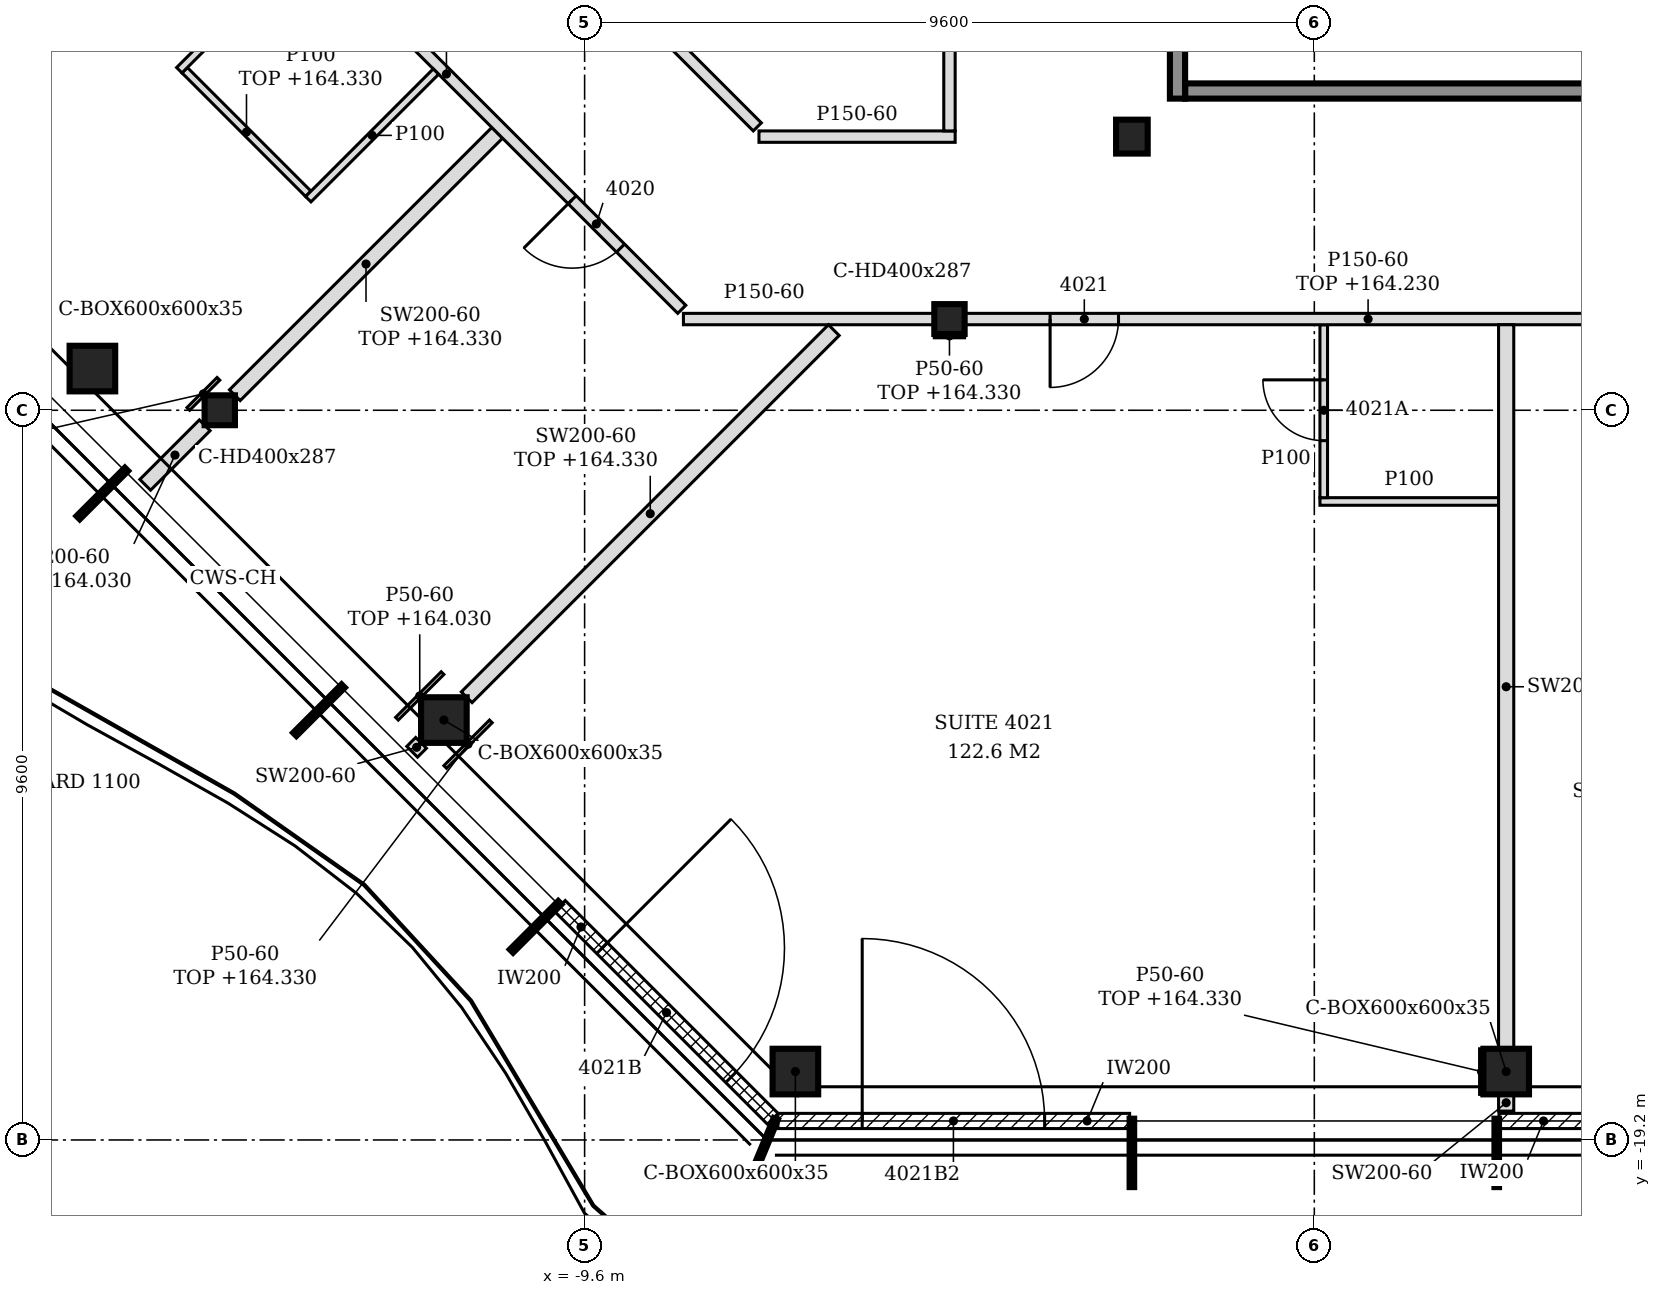
"""IFC4 building model, lengths in metres.
Left out: names, types, materials, properties, quantities, classifications, styles, units other than length and angle.
Written with IfcOpenShell. Run it as: python <this file> out.ifc"""

import sys

from ifc_helpers import new_model, si_unit, direction, frame, frame_2d, origin, origin_2d, place, context, subcontext, project, spatial, polyline, rectangle, hollow_rectangle, i_section, outline, extrude, element, fill, save


model = new_model("IFC4")
c1 = context("Model", 3, precision=1e-05, world=origin(), true_north=direction((0.0, 1.0)))
c2 = subcontext(c1, "Body", "Model", "MODEL_VIEW")
j1 = project(units=[si_unit("LENGTHUNIT", "METRE"), si_unit("PLANEANGLEUNIT", "RADIAN")], contexts=[c1])
p1 = place(None, origin())
s1 = spatial("IfcSite", under=j1, at=p1, CompositionType="ELEMENT")
p2 = place(p1, origin())
s2 = spatial("IfcBuilding", under=s1, at=p2, CompositionType="ELEMENT")
p3 = place(p2, frame((0.0, 0.0, 161.4)))
s3 = spatial("IfcBuildingStorey", under=s2, at=p3, CompositionType="ELEMENT", Elevation=161.4)
for number, where, z_axis, x_axis in (
    (1, (-6.827, -18.3, -0.15), (0.0, 0.0, 1.0), (1.0, 0.0, 0.0)),
    (2, (2.524, -18.3, -0.15), (0.0, 0.0, 1.0), (1.0, 0.0, 0.0)),
    (3, (-16.076, -9.052, -0.15), (0.0, 0.0, 1.0), (1.0, 0.0, 0.0)),
    (4, (-11.451, -13.676, -0.15), (0.0, 0.0, 1.0), (1.0, 0.0, 0.0)),
):
    element("IfcColumn", number, at=place(p3, frame(where, z_axis=z_axis, x_axis=x_axis)), inside=s3, PredefinedType="COLUMN", context=c2, shape_type="SweptSolid", body=[
        extrude(hollow_rectangle(XDim=0.6, YDim=0.6, WallThickness=0.035, at=origin_2d()), origin(), (0.0, 0.0, 1.0), 3.6),
    ])
p4 = place(p3, frame((-4.8, -8.4, -0.15), z_axis=(0.0, 0.0, 1.0), x_axis=(1.0, 0.0, 0.0)))
e5 = element("IfcColumn", 5, at=p4, inside=s3, PredefinedType="COLUMN", context=c2, shape_type="SweptSolid", body=[
    extrude(i_section(OverallWidth=0.399, OverallDepth=0.393, WebThickness=0.023, FlangeThickness=0.037, FilletRadius=0.015, at=origin_2d()), origin(), (0.0, 0.0, 1.0), 3.6),
])
p5 = place(p3, frame((-2.4, -6.0, -0.15), z_axis=(0.0, 0.0, 1.0), x_axis=(1.0, 0.0, 0.0)))
e6 = element("IfcColumn", 6, at=p5, inside=s3, PredefinedType="COLUMN", context=c2, shape_type="SweptSolid", body=[
    extrude(i_section(OverallWidth=0.416, OverallDepth=0.446, WebThickness=0.039, FlangeThickness=0.063, FilletRadius=0.015, at=origin_2d()), origin(), (0.0, 0.0, 1.0), 3.6),
])
p6 = place(p3, frame((-14.4, -9.6, -0.15), z_axis=(0.0, 0.0, 1.0), x_axis=(1.0, 0.0, 0.0)))
e7 = element("IfcColumn", 7, at=p6, inside=s3, PredefinedType="COLUMN", context=c2, shape_type="SweptSolid", body=[
    extrude(i_section(OverallWidth=0.399, OverallDepth=0.393, WebThickness=0.023, FlangeThickness=0.037, FilletRadius=0.015, at=origin_2d()), origin(), (0.0, 0.0, 1.0), 3.6),
])
p7 = place(p3, frame((-7.056, -18.95, 0.0), z_axis=(0.0, 0.0, 1.0), x_axis=(1.0, 0.0, 0.0)))
e8 = element("IfcWall", 8, at=p7, inside=s3, PredefinedType="NOTDEFINED", context=c2, shape_type="SweptSolid", body=[
    extrude(rectangle(XDim=4.626, YDim=0.2, at=frame_2d((2.313, 0.0))), origin(), (0.0, 0.0, 1.0), 3.45),
])
p8 = place(p7, frame((1.108, 0.0, 0.0)))
e9 = element("IfcOpeningElement", 9, at=p8, cuts=e8, PredefinedType="OPENING", context=c2, shape_type="SweptSolid", body=[
    extrude(rectangle(XDim=2.4, YDim=2.4, at=frame_2d((1.2, 1.2))), frame((0.0, 0.11, 0.0), z_axis=(0.0, -1.0, 0.0), x_axis=(1.0, 0.0, 0.0)), (0.0, 0.0, 1.0), 0.22),
])
p9 = place(p3, frame((2.43, -18.95, 0.0), z_axis=(0.0, 0.0, 1.0), x_axis=(1.0, 0.0, 0.0)))
e10 = element("IfcWall", 10, at=p9, inside=s3, PredefinedType="NOTDEFINED", context=c2, shape_type="SweptSolid", body=[
    extrude(rectangle(XDim=4.74, YDim=0.2, at=frame_2d((2.37, 0.0))), origin(), (0.0, 0.0, 1.0), 3.45),
])
p10 = place(p9, frame((1.17, 0.0, 0.0)))
e11 = element("IfcOpeningElement", 11, at=p10, cuts=e10, PredefinedType="OPENING", context=c2, shape_type="SweptSolid", body=[
    extrude(rectangle(XDim=2.4, YDim=2.4, at=frame_2d((1.2, 1.2))), frame((0.0, 0.11, 0.0), z_axis=(0.0, -1.0, 0.0), x_axis=(1.0, 0.0, 0.0)), (0.0, 0.0, 1.0), 0.22),
])
p11 = place(p3, frame((-9.926, -16.121, 0.0), z_axis=(0.0, 0.0, 1.0), x_axis=(0.707137595296, -0.707075965734, 0.0)))
e12 = element("IfcWall", 12, at=p11, inside=s3, PredefinedType="NOTDEFINED", context=c2, shape_type="SweptSolid", body=[
    extrude(rectangle(XDim=3.961, YDim=0.2, at=frame_2d((1.981, 0.0))), origin(), (0.0, 0.0, 1.0), 3.45),
])
p12 = place(p11, frame((0.786, 0.0, 0.0)))
e13 = element("IfcOpeningElement", 13, at=p12, cuts=e12, PredefinedType="OPENING", context=c2, shape_type="SweptSolid", body=[
    extrude(rectangle(XDim=2.4, YDim=2.4, at=frame_2d((1.2, 1.2))), frame((0.0, 0.11, 0.0), z_axis=(0.0, -1.0, 0.0), x_axis=(1.0, 0.0, 0.0)), (0.0, 0.0, 1.0), 0.22),
])
p13 = place(p3, frame((-1.7, -5.4, 0.0), z_axis=(0.0, 0.0, 1.0), x_axis=(1.0, 0.0, 0.0)))
e14 = element("IfcWall", 14, at=p13, inside=s3, PredefinedType="SOLIDWALL", context=c2, shape_type="SweptSolid", body=[
    extrude(rectangle(XDim=7.9, YDim=0.2, at=frame_2d((3.95, 0.0))), origin(), (0.0, 0.0, 1.0), 3.45),
])
p14 = place(p3, frame((-1.8, -5.5, 0.0), z_axis=(0.0, 0.0, 1.0), x_axis=(0.0, 1.0, 0.0)))
e15 = element("IfcWall", 15, at=p14, inside=s3, PredefinedType="SOLIDWALL", context=c2, shape_type="SweptSolid", body=[
    extrude(rectangle(XDim=15.8, YDim=0.2, at=frame_2d((7.9, 0.0))), origin(), (0.0, 0.0, 1.0), 3.45),
])
p15 = place(p14, frame((3.05, 0.0, 0.0)))
e16 = element("IfcOpeningElement", 16, at=p15, cuts=e15, PredefinedType="OPENING", context=c2, shape_type="SweptSolid", body=[
    extrude(rectangle(XDim=1.3, YDim=2.1, at=frame_2d((0.65, 1.05))), frame((0.0, 0.11, 0.0), z_axis=(0.0, -1.0, 0.0), x_axis=(1.0, 0.0, 0.0)), (0.0, 0.0, 1.0), 0.22),
])
p16 = place(p14, frame((11.45, 0.0, 0.0)))
e17 = element("IfcOpeningElement", 17, at=p16, cuts=e15, PredefinedType="OPENING", context=c2, shape_type="SweptSolid", body=[
    extrude(rectangle(XDim=1.3, YDim=2.1, at=frame_2d((0.65, 1.05))), frame((0.0, 0.11, 0.0), z_axis=(0.0, -1.0, 0.0), x_axis=(1.0, 0.0, 0.0)), (0.0, 0.0, 1.0), 0.22),
])
p17 = place(p3, frame((2.524, -18.82, 0.0), z_axis=(0.0, 0.0, 1.0), x_axis=(0.0, 1.0, 0.0)))
e18 = element("IfcWall", 18, at=p17, inside=s3, PredefinedType="PARTITIONING", context=c2, shape_type="SweptSolid", body=[
    extrude(rectangle(XDim=0.22, YDim=0.2, at=frame_2d((0.11, 0.0))), origin(), (0.0, 0.0, 1.0), 3.45),
])
p18 = place(p3, frame((2.524, -18.0, 0.0), z_axis=(0.0, 0.0, 1.0), x_axis=(0.0, 1.0, 0.0)))
e19 = element("IfcWall", 19, at=p18, inside=s3, PredefinedType="PARTITIONING", context=c2, shape_type="SweptSolid", body=[
    extrude(outline(polyline([(0.0, 0.0), (9.525, 0.0), (9.525, 2.83), (9.45, 2.83), (9.448, 3.45), (3.705, 3.45), (3.703, 2.88), (3.495, 2.88), (3.493, 3.45), (0.0, 3.45), (0.0, 0.0)])), frame((0.0, 0.1, 0.0), z_axis=(0.0, -1.0, 0.0), x_axis=(1.0, 0.0, 0.0)), (0.0, 0.0, 1.0), 0.2),
])
p19 = place(p3, frame((-11.869, -14.093, 0.0), z_axis=(0.0, 0.0, 1.0), x_axis=(0.707106781187, 0.707106781187, 0.0)))
e20 = element("IfcWall", 20, at=p19, inside=s3, PredefinedType="PARTITIONING", context=c2, shape_type="SweptSolid", body=[
    extrude(rectangle(XDim=0.166, YDim=0.2, at=frame_2d((0.083, 0.0))), origin(), (0.0, 0.0, 1.0), 3.45),
])
p20 = place(p3, frame((-11.152, -13.375, 0.0), z_axis=(0.0, 0.0, 1.0), x_axis=(0.707106781187, 0.707106781187, 0.0)))
e21 = element("IfcWall", 21, at=p20, inside=s3, PredefinedType="PARTITIONING", context=c2, shape_type="SweptSolid", body=[
    extrude(rectangle(XDim=6.83, YDim=0.2, at=frame_2d((3.415, 0.0))), origin(), (0.0, 0.0, 1.0), 2.93),
])
p21 = place(p3, frame((0.074, -10.8, 0.0), z_axis=(0.0, 0.0, 1.0), x_axis=(1.0, 0.0, 0.0)))
e22 = element("IfcWall", 22, at=p21, inside=s3, PredefinedType="PARTITIONING", context=c2, shape_type="SweptSolid", body=[
    extrude(rectangle(XDim=2.35, YDim=0.1, at=frame_2d((1.175, 0.0))), origin(), (0.0, 0.0, 1.0), 3.45),
])
p22 = place(p3, frame((0.124, -10.75, 0.0), z_axis=(0.0, 0.0, 1.0), x_axis=(0.0, 1.0, 0.0)))
e23 = element("IfcWall", 23, at=p22, inside=s3, PredefinedType="PARTITIONING", context=c2, shape_type="SweptSolid", body=[
    extrude(outline(polyline([(0.0, 0.0), (2.275, 0.0), (2.275, 2.83), (2.2, 2.83), (2.198, 3.45), (0.0, 3.45), (0.0, 0.0)])), frame((0.0, 0.05, 0.0), z_axis=(0.0, -1.0, 0.0), x_axis=(1.0, 0.0, 0.0)), (0.0, 0.0, 1.0), 0.1),
])
p23 = place(p22, frame((0.75, 0.0, 0.0)))
e24 = element("IfcOpeningElement", 24, at=p23, cuts=e23, PredefinedType="OPENING", context=c2, shape_type="SweptSolid", body=[
    extrude(rectangle(XDim=0.8, YDim=2.1, at=frame_2d((0.4, 1.05))), frame((0.0, 0.06, 0.0), z_axis=(0.0, -1.0, 0.0), x_axis=(1.0, 0.0, 0.0)), (0.0, 0.0, 1.0), 0.12),
])
p24 = place(p3, frame((-15.381, -10.581, 0.0), z_axis=(0.0, 0.0, 1.0), x_axis=(0.707217034054, 0.706996511125, 0.0)))
e25 = element("IfcWall", 25, at=p24, inside=s3, PredefinedType="PARTITIONING", context=c2, shape_type="SweptSolid", body=[
    extrude(rectangle(XDim=1.107, YDim=0.2, at=frame_2d((0.554, 0.0))), origin(), (0.0, 0.0, 1.0), 2.63),
])
p25 = place(p3, frame((-14.202, -9.402, 0.0), z_axis=(0.0, 0.0, 1.0), x_axis=(0.707081776084, 0.707131785404, 0.0)))
e26 = element("IfcWall", 26, at=p25, inside=s3, PredefinedType="PARTITIONING", context=c2, shape_type="SweptSolid", body=[
    extrude(rectangle(XDim=4.882, YDim=0.2, at=frame_2d((2.441, 0.0))), origin(), (0.0, 0.0, 1.0), 2.93),
])
p26 = place(p3, frame((-8.3, -8.4, 0.0), z_axis=(0.0, 0.0, 1.0), x_axis=(1.0, 0.0, 0.0)))
e27 = element("IfcWall", 27, at=p26, inside=s3, PredefinedType="PARTITIONING", context=c2, shape_type="SweptSolid", body=[
    extrude(rectangle(XDim=3.301, YDim=0.15, at=frame_2d((1.65, 0.0))), origin(), (0.0, 0.0, 1.0), 3.45),
])
p27 = place(p3, frame((-4.601, -8.4, 0.0), z_axis=(0.0, 0.0, 1.0), x_axis=(1.0, 0.0, 0.0)))
e28 = element("IfcWall", 28, at=p27, inside=s3, PredefinedType="PARTITIONING", context=c2, shape_type="SweptSolid", body=[
    extrude(rectangle(XDim=11.601, YDim=0.15, at=frame_2d((5.801, 0.0))), origin(), (0.0, 0.0, 1.0), 2.83),
])
p28 = place(p27, frame((1.125, 0.0, 0.0)))
e29 = element("IfcOpeningElement", 29, at=p28, cuts=e28, PredefinedType="OPENING", context=c2, shape_type="SweptSolid", body=[
    extrude(rectangle(XDim=0.9, YDim=2.1, at=frame_2d((0.45, 1.05))), frame((0.0, 0.085, 0.0), z_axis=(0.0, -1.0, 0.0), x_axis=(1.0, 0.0, 0.0)), (0.0, 0.0, 1.0), 0.17),
])
p29 = place(p27, frame((8.592, 0.0, 0.0)))
e30 = element("IfcOpeningElement", 30, at=p29, cuts=e28, PredefinedType="OPENING", context=c2, shape_type="SweptSolid", body=[
    extrude(rectangle(XDim=0.9, YDim=2.1, at=frame_2d((0.45, 1.05))), frame((0.0, 0.085, 0.0), z_axis=(0.0, -1.0, 0.0), x_axis=(1.0, 0.0, 0.0)), (0.0, 0.0, 1.0), 0.17),
])
p30 = place(p3, frame((-8.322, -8.272, 0.0), z_axis=(0.0, 0.0, 1.0), x_axis=(-0.707106781187, 0.707106781187, 0.0)))
e31 = element("IfcWall", 31, at=p30, inside=s3, PredefinedType="PARTITIONING", context=c2, shape_type="SweptSolid", body=[
    extrude(rectangle(XDim=6.718, YDim=0.15, at=frame_2d((3.359, 0.0))), origin(), (0.0, 0.0, 1.0), 2.93),
])
p31 = place(p30, frame((1.139, 0.0, 0.0)))
e32 = element("IfcOpeningElement", 32, at=p31, cuts=e31, PredefinedType="OPENING", context=c2, shape_type="SweptSolid", body=[
    extrude(rectangle(XDim=0.9, YDim=2.1, at=frame_2d((0.45, 1.05))), frame((0.0, 0.085, 0.0), z_axis=(0.0, -1.0, 0.0), x_axis=(1.0, 0.0, 0.0)), (0.0, 0.0, 1.0), 0.17),
])
p32 = place(p3, frame((-13.235, -6.753, 0.0), z_axis=(0.0, 0.0, 1.0), x_axis=(-0.707106781187, 0.707106781187, 0.0)))
e33 = element("IfcWall", 33, at=p32, inside=s3, PredefinedType="PARTITIONING", context=c2, shape_type="SweptSolid", body=[
    extrude(rectangle(XDim=2.3, YDim=0.1, at=frame_2d((1.15, 0.0))), origin(), (0.0, 0.0, 1.0), 2.93),
])
p33 = place(p3, frame((-13.235, -6.823, 0.0), z_axis=(0.0, 0.0, 1.0), x_axis=(0.707106781187, 0.707106781187, 0.0)))
e34 = element("IfcWall", 34, at=p33, inside=s3, PredefinedType="PARTITIONING", context=c2, shape_type="SweptSolid", body=[
    extrude(rectangle(XDim=2.375, YDim=0.1, at=frame_2d((1.188, 0.0))), origin(), (0.0, 0.0, 1.0), 3.45),
])
p34 = place(p3, frame((-7.306, -6.0, 0.0), z_axis=(0.0, 0.0, 1.0), x_axis=(1.0, 0.0, 0.0)))
e35 = element("IfcWall", 35, at=p34, inside=s3, PredefinedType="PARTITIONING", context=c2, shape_type="SweptSolid", body=[
    extrude(outline(polyline([(0.0, 0.0), (2.581, 0.0), (2.581, 2.83), (2.356, 2.83), (2.354, 3.45), (0.0, 3.45), (0.0, 0.0)])), frame((0.0, 0.075, 0.0), z_axis=(0.0, -1.0, 0.0), x_axis=(1.0, 0.0, 0.0)), (0.0, 0.0, 1.0), 0.15),
])
p35 = place(p3, frame((-7.328, -5.872, 0.0), z_axis=(0.0, 0.0, 1.0), x_axis=(-0.707106781187, 0.707106781187, 0.0)))
e36 = element("IfcWall", 36, at=p35, inside=s3, PredefinedType="PARTITIONING", context=c2, shape_type="SweptSolid", body=[
    extrude(rectangle(XDim=4.729, YDim=0.15, at=frame_2d((2.365, 0.0))), origin(), (0.0, 0.0, 1.0), 2.93),
])
p36 = place(p3, frame((-4.8, -5.925, 0.0), z_axis=(0.0, 0.0, 1.0), x_axis=(0.0, 1.0, 0.0)))
e37 = element("IfcWall", 37, at=p36, inside=s3, PredefinedType="PARTITIONING", context=c2, shape_type="SweptSolid", body=[
    extrude(rectangle(XDim=8.129, YDim=0.15, at=frame_2d((4.064, 0.0))), origin(), (0.0, 0.0, 1.0), 2.83),
])
p37 = place(p3, frame((-14.932, -5.126, 0.0), z_axis=(0.0, 0.0, 1.0), x_axis=(0.707106781187, 0.707106781187, 0.0)))
e38 = element("IfcWall", 38, at=p37, inside=s3, PredefinedType="PARTITIONING", context=c2, shape_type="SweptSolid", body=[
    extrude(rectangle(XDim=2.294, YDim=0.1, at=frame_2d((1.147, 0.0))), origin(), (0.0, 0.0, 1.0), 2.93),
])
p38 = place(p37, frame((0.85, 0.0, 0.0)))
e39 = element("IfcOpeningElement", 39, at=p38, cuts=e38, PredefinedType="OPENING", context=c2, shape_type="SweptSolid", body=[
    extrude(rectangle(XDim=0.8, YDim=2.1, at=frame_2d((0.4, 1.05))), frame((0.0, 0.06, 0.0), z_axis=(0.0, -1.0, 0.0), x_axis=(1.0, 0.0, 0.0)), (0.0, 0.0, 1.0), 0.12),
])
p39 = place(p3, frame((2.199, -18.6, 0.0), z_axis=(0.0, 0.0, 1.0), x_axis=(0.0, 1.0, 0.0)))
e40 = element("IfcWall", 40, at=p39, inside=s3, PredefinedType="PARTITIONING", context=c2, shape_type="SweptSolid", body=[
    extrude(rectangle(XDim=0.6, YDim=0.05, at=frame_2d((0.3, 0.0))), origin(), (0.0, 0.0, 1.0), 2.93),
])
p40 = place(p3, frame((-12.069, -13.658, 0.0), z_axis=(0.0, 0.0, 1.0), x_axis=(0.707106781187, 0.707106781187, 0.0)))
e41 = element("IfcWall", 41, at=p40, inside=s3, PredefinedType="PARTITIONING", context=c2, shape_type="SweptSolid", body=[
    extrude(rectangle(XDim=0.848, YDim=0.05, at=frame_2d((0.424, 0.0))), origin(), (0.0, 0.0, 1.0), 2.63),
])
p41 = place(p3, frame((-11.434, -14.293, 0.0), z_axis=(0.0, 0.0, 1.0), x_axis=(0.707106781187, 0.707106781187, 0.0)))
e42 = element("IfcWall", 42, at=p41, inside=s3, PredefinedType="PARTITIONING", context=c2, shape_type="SweptSolid", body=[
    extrude(rectangle(XDim=0.849, YDim=0.05, at=frame_2d((0.424, 0.0))), origin(), (0.0, 0.0, 1.0), 2.93),
])
p42 = place(p3, frame((-14.814, -9.582, 0.0), z_axis=(0.0, 0.0, 1.0), x_axis=(0.707106781187, 0.707106781187, 0.0)))
e43 = element("IfcWall", 43, at=p42, inside=s3, PredefinedType="PARTITIONING", context=c2, shape_type="SweptSolid", body=[
    extrude(rectangle(XDim=0.56, YDim=0.05, at=frame_2d((0.28, 0.0))), origin(), (0.0, 0.0, 1.0), 2.93),
])
p43 = place(p3, frame((-5.0, -8.622, 0.0), z_axis=(0.0, 0.0, 1.0), x_axis=(1.0, 0.0, 0.0)))
e44 = element("IfcWall", 44, at=p43, inside=s3, PredefinedType="PARTITIONING", context=c2, shape_type="SweptSolid", body=[
    extrude(rectangle(XDim=0.399, YDim=0.05, at=frame_2d((0.199, 0.0))), origin(), (0.0, 0.0, 1.0), 2.93),
])
p44 = place(p8, origin())
e45 = element("IfcDoor", 45, at=p44, inside=s3, OperationType="SINGLE_SWING_LEFT", PredefinedType="DOOR", context=c2, shape_type="SweptSolid", body=[
    extrude(rectangle(XDim=2.4, YDim=2.4, at=frame_2d((1.2, 1.2))), frame((0.0, 0.025, 0.0), z_axis=(0.0, -1.0, 0.0), x_axis=(1.0, 0.0, 0.0)), (0.0, 0.0, 1.0), 0.05),
])
fill(e9, e45)
p45 = place(p12, origin())
e46 = element("IfcDoor", 46, at=p45, inside=s3, OperationType="SINGLE_SWING_LEFT", PredefinedType="DOOR", context=c2, shape_type="SweptSolid", body=[
    extrude(rectangle(XDim=2.4, YDim=2.4, at=frame_2d((1.2, 1.2))), frame((0.0, 0.025, 0.0), z_axis=(0.0, -1.0, 0.0), x_axis=(1.0, 0.0, 0.0)), (0.0, 0.0, 1.0), 0.05),
])
fill(e13, e46)
p46 = place(p31, origin())
e47 = element("IfcDoor", 47, at=p46, inside=s3, OperationType="SINGLE_SWING_RIGHT", PredefinedType="DOOR", context=c2, shape_type="SweptSolid", body=[
    extrude(rectangle(XDim=0.9, YDim=2.1, at=frame_2d((0.45, 1.05))), frame((0.0, 0.025, 0.0), z_axis=(0.0, -1.0, 0.0), x_axis=(1.0, 0.0, 0.0)), (0.0, 0.0, 1.0), 0.05),
])
fill(e32, e47)
p47 = place(p28, frame((0.9, 0.0, 0.0), z_axis=(0.0, 0.0, 1.0), x_axis=(-1.0, 0.0, 0.0)))
e48 = element("IfcDoor", 48, at=p47, inside=s3, OperationType="SINGLE_SWING_RIGHT", PredefinedType="DOOR", context=c2, shape_type="SweptSolid", body=[
    extrude(rectangle(XDim=0.9, YDim=2.1, at=frame_2d((0.45, 1.05))), frame((0.0, 0.025, 0.0), z_axis=(0.0, -1.0, 0.0), x_axis=(1.0, 0.0, 0.0)), (0.0, 0.0, 1.0), 0.05),
])
fill(e29, e48)
p48 = place(p23, origin())
e49 = element("IfcDoor", 49, at=p48, inside=s3, OperationType="SINGLE_SWING_RIGHT", PredefinedType="DOOR", context=c2, shape_type="SweptSolid", body=[
    extrude(rectangle(XDim=0.8, YDim=2.1, at=frame_2d((0.4, 1.05))), frame((0.0, 0.025, 0.0), z_axis=(0.0, -1.0, 0.0), x_axis=(1.0, 0.0, 0.0)), (0.0, 0.0, 1.0), 0.05),
])
fill(e24, e49)
save(model, sys.argv[1])
